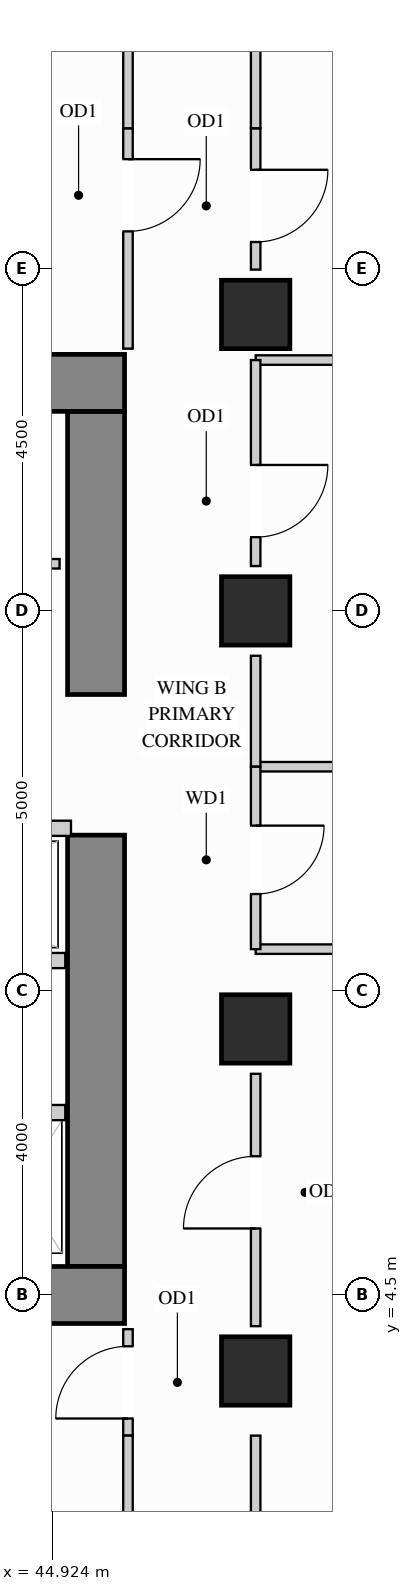
"""IFC4 building model, lengths in metres.
Left out: names, types, materials, properties, quantities, classifications, styles, units other than length and angle.
Written with IfcOpenShell. Run it as: python <this file> out.ifc"""

import sys

from ifc_helpers import new_model, si_unit, direction, frame, frame_2d, origin, origin_2d, place, context, subcontext, project, spatial, rectangle, extrude, source, transform, mapped, element, fill, save


model = new_model("IFC4")
c1 = context("Model", 3, precision=1e-05, world=origin(), true_north=direction((0.0, 1.0)))
c2 = subcontext(c1, "Body", "Model", "MODEL_VIEW")
j1 = project(units=[si_unit("LENGTHUNIT", "METRE"), si_unit("PLANEANGLEUNIT", "RADIAN")], contexts=[c1])
p1 = place(None, origin())
s1 = spatial("IfcSite", under=j1, at=p1, CompositionType="ELEMENT")
p2 = place(p1, origin())
s2 = spatial("IfcBuilding", under=s1, at=p2, CompositionType="ELEMENT")
p3 = place(p2, frame((0.0, 0.0, 131.4)))
s3 = spatial("IfcBuildingStorey", under=s2, at=p3, CompositionType="ELEMENT", Elevation=131.4)
m1 = source(origin(), c2, "Body", "SweptSolid", [
    extrude(rectangle(XDim=0.9, YDim=0.9, at=origin_2d()), origin(), (0.0, 0.0, 1.0), 3.38),
])
for number, where, z_axis, x_axis in (
    (1, (47.6, 13.5, 0.0), (0.0, 0.0, 1.0), (1.0, 0.0, 0.0)),
    (2, (47.6, 3.5, 0.0), (0.0, 0.0, 1.0), (1.0, 0.0, 0.0)),
    (3, (47.6, 8.0, 0.0), (0.0, 0.0, 1.0), (1.0, 0.0, 0.0)),
    (4, (47.6, 17.4, 0.0), (0.0, 0.0, 1.0), (1.0, 0.0, 0.0)),
):
    element("IfcColumn", number, at=place(p3, frame(where, z_axis=z_axis, x_axis=x_axis)), inside=s3, PredefinedType="COLUMN", context=c2, shape_type="MappedRepresentation", body=[
        mapped(m1, transform((0.0, 0.0, 0.0), x_axis=(1.0, 0.0, 0.0), y_axis=(0.0, 1.0, 0.0), z_axis=(0.0, 0.0, 1.0))),
    ])
m2 = source(origin(), c2, "Body", "SweptSolid", [
    extrude(rectangle(XDim=5.675, YDim=0.75, at=frame_2d((2.837, 0.0))), origin(), (0.0, 0.0, 1.0), 3.38),
])
p4 = place(p3, frame((45.5, 4.875, 0.0), z_axis=(0.0, 0.0, 1.0), x_axis=(0.0, 1.0, 0.0)))
e5 = element("IfcWall", 5, at=p4, inside=s3, PredefinedType="SHEAR", context=c2, shape_type="MappedRepresentation", body=[
    mapped(m2, transform((0.0, 0.0, 0.0), x_axis=(1.0, 0.0, 0.0), y_axis=(0.0, 1.0, 0.0), z_axis=(0.0, 0.0, 1.0))),
])
m3 = source(origin(), c2, "Body", "SweptSolid", [
    extrude(rectangle(XDim=3.725, YDim=0.75, at=frame_2d((1.863, 0.0))), origin(), (0.0, 0.0, 1.0), 3.38),
])
p5 = place(p3, frame((45.5, 12.4, 0.0), z_axis=(0.0, 0.0, 1.0), x_axis=(0.0, 1.0, 0.0)))
e6 = element("IfcWall", 6, at=p5, inside=s3, PredefinedType="SHEAR", context=c2, shape_type="MappedRepresentation", body=[
    mapped(m3, transform((0.0, 0.0, 0.0), x_axis=(1.0, 0.0, 0.0), y_axis=(0.0, 1.0, 0.0), z_axis=(0.0, 0.0, 1.0))),
])
m4 = source(origin(), c2, "Body", "SweptSolid", [
    extrude(rectangle(XDim=10.25, YDim=0.75, at=frame_2d((5.125, 0.0))), origin(), (0.0, 0.0, 1.0), 3.38),
])
for number, where, z_axis, x_axis in (
    (7, (35.625, 16.5, 0.0), (0.0, 0.0, 1.0), (1.0, 0.0, 0.0)),
    (8, (35.625, 4.5, 0.0), (0.0, 0.0, 1.0), (1.0, 0.0, 0.0)),
):
    element("IfcWall", number, at=place(p3, frame(where, z_axis=z_axis, x_axis=x_axis)), inside=s3, PredefinedType="SHEAR", context=c2, shape_type="MappedRepresentation", body=[
        mapped(m4, transform((0.0, 0.0, 0.0), x_axis=(1.0, 0.0, 0.0), y_axis=(0.0, 1.0, 0.0), z_axis=(0.0, 0.0, 1.0))),
    ])
p6 = place(p3, frame((41.8, 14.12, 0.0), z_axis=(0.0, 0.0, 1.0), x_axis=(1.0, 0.0, 0.0)))
e9 = element("IfcWall", 9, at=p6, inside=s3, PredefinedType="PARTITIONING", context=c2, shape_type="SweptSolid", body=[
    extrude(rectangle(XDim=3.22, YDim=0.125, at=frame_2d((1.61, 0.0))), origin(), (0.0, 0.0, 1.0), 3.365),
])
p7 = place(p6, frame((1.135, 0.0, 0.0)))
e10 = element("IfcOpeningElement", 10, at=p7, cuts=e9, PredefinedType="OPENING", context=c2, shape_type="SweptSolid", body=[
    extrude(rectangle(XDim=0.85, YDim=2.1, at=frame_2d((0.425, 1.05))), frame((0.0, 0.073, 0.0), z_axis=(0.0, -1.0, 0.0), x_axis=(1.0, 0.0, 0.0)), (0.0, 0.0, 1.0), 0.145),
])
m5 = source(origin(), c2, "Body", "SweptSolid", [
    extrude(rectangle(XDim=8.048, YDim=0.125, at=frame_2d((4.024, 0.0))), origin(), (0.0, 0.0, 1.0), 3.365),
])
for number, where, z_axis, x_axis in (
    (11, (47.6, 11.45, 0.0), (0.0, 0.0, 1.0), (1.0, 0.0, 0.0)),
    (12, (47.6, 16.8, 0.0), (0.0, 0.0, 1.0), (1.0, 0.0, 0.0)),
    (13, (47.6, 9.05, 0.0), (0.0, 0.0, 1.0), (1.0, 0.0, 0.0)),
):
    element("IfcWall", number, at=place(p3, frame(where, z_axis=z_axis, x_axis=x_axis)), inside=s3, PredefinedType="PARTITIONING", context=c2, shape_type="MappedRepresentation", body=[
        mapped(m5, transform((0.0, 0.0, 0.0), x_axis=(1.0, 0.0, 0.0), y_axis=(0.0, 1.0, 0.0), z_axis=(0.0, 0.0, 1.0))),
    ])
p8 = place(p3, frame((47.6, 4.09, 0.0), z_axis=(0.0, 0.0, 1.0), x_axis=(0.0, 1.0, 0.0)))
e14 = element("IfcWall", 14, at=p8, inside=s3, PredefinedType="PARTITIONING", context=c2, shape_type="SweptSolid", body=[
    extrude(rectangle(XDim=3.32, YDim=0.125, at=frame_2d((1.66, 0.0))), origin(), (0.0, 0.0, 1.0), 2.677),
])
p9 = place(p8, frame((1.285, 0.0, 0.0)))
e15 = element("IfcOpeningElement", 15, at=p9, cuts=e14, PredefinedType="OPENING", context=c2, shape_type="SweptSolid", body=[
    extrude(rectangle(XDim=0.95, YDim=2.15, at=frame_2d((0.475, 1.075))), frame((0.0, 0.073, 0.0), z_axis=(0.0, -1.0, 0.0), x_axis=(1.0, 0.0, 0.0)), (0.0, 0.0, 1.0), 0.145),
])
m6 = source(origin(), c2, "Body", "SweptSolid", [
    extrude(rectangle(XDim=1.46, YDim=0.125, at=frame_2d((0.73, 0.0))), origin(), (0.0, 0.0, 1.0), 2.677),
])
for number, where, z_axis, x_axis in (
    (16, (47.6, 1.19, 0.0), (0.0, 0.0, 1.0), (0.0, 1.0, 0.0)),
    (17, (47.6, 11.45, 0.0), (0.0, 0.0, 1.0), (0.0, 1.0, 0.0)),
):
    element("IfcWall", number, at=place(p3, frame(where, z_axis=z_axis, x_axis=x_axis)), inside=s3, PredefinedType="PARTITIONING", context=c2, shape_type="MappedRepresentation", body=[
        mapped(m6, transform((0.0, 0.0, 0.0), x_axis=(1.0, 0.0, 0.0), y_axis=(0.0, 1.0, 0.0), z_axis=(0.0, 0.0, 1.0))),
    ])
p10 = place(p3, frame((47.6, 14.09, 0.0), z_axis=(0.0, 0.0, 1.0), x_axis=(0.0, 1.0, 0.0)))
e18 = element("IfcWall", 18, at=p10, inside=s3, PredefinedType="PARTITIONING", context=c2, shape_type="SweptSolid", body=[
    extrude(rectangle(XDim=2.71, YDim=0.125, at=frame_2d((1.355, 0.0))), origin(), (0.0, 0.0, 1.0), 2.677),
])
p11 = place(p10, frame((0.38, 0.0, 0.0)))
e19 = element("IfcOpeningElement", 19, at=p11, cuts=e18, PredefinedType="OPENING", context=c2, shape_type="SweptSolid", body=[
    extrude(rectangle(XDim=0.95, YDim=2.15, at=frame_2d((0.475, 1.075))), frame((0.0, 0.073, 0.0), z_axis=(0.0, -1.0, 0.0), x_axis=(1.0, 0.0, 0.0)), (0.0, 0.0, 1.0), 0.145),
])
p12 = place(p3, frame((47.6, 17.99, 0.0), z_axis=(0.0, 0.0, 1.0), x_axis=(0.0, 1.0, 0.0)))
e20 = element("IfcWall", 20, at=p12, inside=s3, PredefinedType="PARTITIONING", context=c2, shape_type="SweptSolid", body=[
    extrude(rectangle(XDim=1.86, YDim=0.125, at=frame_2d((0.93, 0.0))), origin(), (0.0, 0.0, 1.0), 2.677),
])
p13 = place(p12, frame((0.363, 0.0, 0.0)))
e21 = element("IfcOpeningElement", 21, at=p13, cuts=e20, PredefinedType="OPENING", context=c2, shape_type="SweptSolid", body=[
    extrude(rectangle(XDim=0.95, YDim=2.15, at=frame_2d((0.475, 1.075))), frame((0.0, 0.073, 0.0), z_axis=(0.0, -1.0, 0.0), x_axis=(1.0, 0.0, 0.0)), (0.0, 0.0, 1.0), 0.145),
])
p14 = place(p3, frame((47.6, 19.85, 0.0), z_axis=(0.0, 0.0, 1.0), x_axis=(0.0, 1.0, 0.0)))
e22 = element("IfcWall", 22, at=p14, inside=s3, PredefinedType="PARTITIONING", context=c2, shape_type="MappedRepresentation", body=[
    mapped(m6, transform((0.0, 0.0, 0.0), x_axis=(1.0, 0.0, 0.0), y_axis=(0.0, 1.0, 0.0), z_axis=(0.0, 0.0, 1.0))),
])
p15 = place(p3, frame((47.6, 9.05, 0.0), z_axis=(0.0, 0.0, 1.0), x_axis=(0.0, 1.0, 0.0)))
e23 = element("IfcWall", 23, at=p15, inside=s3, PredefinedType="PARTITIONING", context=c2, shape_type="SweptSolid", body=[
    extrude(rectangle(XDim=2.4, YDim=0.125, at=frame_2d((1.2, 0.0))), origin(), (0.0, 0.0, 1.0), 2.677),
])
p16 = place(p15, frame((0.725, 0.0, 0.0)))
e24 = element("IfcOpeningElement", 24, at=p16, cuts=e23, PredefinedType="OPENING", context=c2, shape_type="SweptSolid", body=[
    extrude(rectangle(XDim=0.9, YDim=2.15, at=frame_2d((0.45, 1.075))), frame((0.0, 0.073, 0.0), z_axis=(0.0, -1.0, 0.0), x_axis=(1.0, 0.0, 0.0)), (0.0, 0.0, 1.0), 0.145),
])
p17 = place(p3, frame((45.92, 16.95, 0.0), z_axis=(0.0, 0.0, 1.0), x_axis=(0.0, 1.0, 0.0)))
e25 = element("IfcWall", 25, at=p17, inside=s3, PredefinedType="PARTITIONING", context=c2, shape_type="SweptSolid", body=[
    extrude(rectangle(XDim=2.9, YDim=0.125, at=frame_2d((1.45, 0.0))), origin(), (0.0, 0.0, 1.0), 3.365),
])
p18 = place(p17, frame((1.543, 0.0, 0.0)))
e26 = element("IfcOpeningElement", 26, at=p18, cuts=e25, PredefinedType="OPENING", context=c2, shape_type="SweptSolid", body=[
    extrude(rectangle(XDim=0.95, YDim=2.15, at=frame_2d((0.475, 1.075))), frame((0.0, 0.073, 0.0), z_axis=(0.0, -1.0, 0.0), x_axis=(1.0, 0.0, 0.0)), (0.0, 0.0, 1.0), 0.145),
])
m7 = source(origin(), c2, "Body", "SweptSolid", [
    extrude(rectangle(XDim=2.298, YDim=0.125, at=frame_2d((1.149, 0.0))), origin(), (0.0, 0.0, 1.0), 3.365),
])
p19 = place(p3, frame((45.92, 19.85, 0.0), z_axis=(0.0, 0.0, 1.0), x_axis=(0.0, 1.0, 0.0)))
e27 = element("IfcWall", 27, at=p19, inside=s3, PredefinedType="PARTITIONING", context=c2, shape_type="MappedRepresentation", body=[
    mapped(m7, transform((0.0, 0.0, 0.0), x_axis=(1.0, 0.0, 0.0), y_axis=(0.0, 1.0, 0.0), z_axis=(0.0, 0.0, 1.0))),
])
p20 = place(p3, frame((45.92, 2.65, 0.0), z_axis=(0.0, 0.0, 1.0), x_axis=(0.0, 1.0, 0.0)))
e28 = element("IfcWall", 28, at=p20, inside=s3, PredefinedType="PARTITIONING", context=c2, shape_type="SweptSolid", body=[
    extrude(rectangle(XDim=1.4, YDim=0.125, at=frame_2d((0.7, 0.0))), origin(), (0.0, 0.0, 1.0), 3.365),
])
p21 = place(p20, frame((0.225, 0.0, 0.0)))
e29 = element("IfcOpeningElement", 29, at=p21, cuts=e28, PredefinedType="OPENING", context=c2, shape_type="SweptSolid", body=[
    extrude(rectangle(XDim=0.95, YDim=2.15, at=frame_2d((0.475, 1.075))), frame((0.0, 0.073, 0.0), z_axis=(0.0, -1.0, 0.0), x_axis=(1.0, 0.0, 0.0)), (0.0, 0.0, 1.0), 0.145),
])
p22 = place(p3, frame((45.92, 0.352, 0.0), z_axis=(0.0, 0.0, 1.0), x_axis=(0.0, 1.0, 0.0)))
e30 = element("IfcWall", 30, at=p22, inside=s3, PredefinedType="PARTITIONING", context=c2, shape_type="MappedRepresentation", body=[
    mapped(m7, transform((0.0, 0.0, 0.0), x_axis=(1.0, 0.0, 0.0), y_axis=(0.0, 1.0, 0.0), z_axis=(0.0, 0.0, 1.0))),
])
m8 = source(origin(), c2, "Body", "SweptSolid", [
    extrude(rectangle(XDim=1.245, YDim=0.2, at=frame_2d((0.623, 0.0))), origin(), (0.0, 0.0, 1.0), 3.365),
])
p23 = place(p3, frame((43.85, 6.9, 0.0), z_axis=(0.0, 0.0, 1.0), x_axis=(1.0, 0.0, 0.0)))
e31 = element("IfcWall", 31, at=p23, inside=s3, PredefinedType="PARTITIONING", context=c2, shape_type="MappedRepresentation", body=[
    mapped(m8, transform((0.0, 0.0, 0.0), x_axis=(1.0, 0.0, 0.0), y_axis=(0.0, 1.0, 0.0), z_axis=(0.0, 0.0, 1.0))),
])
m9 = source(origin(), c2, "Body", "SweptSolid", [
    extrude(rectangle(XDim=3.49, YDim=0.2, at=frame_2d((1.745, 0.0))), origin(), (0.0, 0.0, 1.0), 3.365),
])
p24 = place(p3, frame((41.68, 10.64, 0.0), z_axis=(0.0, 0.0, 1.0), x_axis=(1.0, 0.0, 0.0)))
e32 = element("IfcWall", 32, at=p24, inside=s3, PredefinedType="PARTITIONING", context=c2, shape_type="MappedRepresentation", body=[
    mapped(m9, transform((0.0, 0.0, 0.0), x_axis=(1.0, 0.0, 0.0), y_axis=(0.0, 1.0, 0.0), z_axis=(0.0, 0.0, 1.0))),
])
m10 = source(origin(), c2, "Body", "SweptSolid", [
    extrude(rectangle(XDim=3.415, YDim=0.2, at=frame_2d((1.708, 0.0))), origin(), (0.0, 0.0, 1.0), 3.365),
])
p25 = place(p3, frame((41.68, 8.9, 0.0), z_axis=(0.0, 0.0, 1.0), x_axis=(1.0, 0.0, 0.0)))
e33 = element("IfcWall", 33, at=p25, inside=s3, PredefinedType="PARTITIONING", context=c2, shape_type="MappedRepresentation", body=[
    mapped(m10, transform((0.0, 0.0, 0.0), x_axis=(1.0, 0.0, 0.0), y_axis=(0.0, 1.0, 0.0), z_axis=(0.0, 0.0, 1.0))),
])
m11 = source(origin(), c2, "Body", "SweptSolid", [
    extrude(rectangle(XDim=0.95, YDim=2.15, at=frame_2d((0.475, 1.075))), frame((0.0, 0.025, 0.0), z_axis=(0.0, -1.0, 0.0), x_axis=(1.0, 0.0, 0.0)), (0.0, 0.0, 1.0), 0.05),
])
p26 = place(p18, origin())
e34 = element("IfcDoor", 34, at=p26, inside=s3, OperationType="SINGLE_SWING_RIGHT", PredefinedType="DOOR", context=c2, shape_type="MappedRepresentation", body=[
    mapped(m11, transform((0.0, 0.0, 0.0), x_axis=(1.0, 0.0, 0.0), y_axis=(0.0, 1.0, 0.0), z_axis=(0.0, 0.0, 1.0))),
])
fill(e26, e34)
p27 = place(p21, origin())
e35 = element("IfcDoor", 35, at=p27, inside=s3, OperationType="SINGLE_SWING_LEFT", PredefinedType="DOOR", context=c2, shape_type="MappedRepresentation", body=[
    mapped(m11, transform((0.0, 0.0, 0.0), x_axis=(1.0, 0.0, 0.0), y_axis=(0.0, 1.0, 0.0), z_axis=(0.0, 0.0, 1.0))),
])
fill(e29, e35)
p28 = place(p9, origin())
e36 = element("IfcDoor", 36, at=p28, inside=s3, OperationType="SINGLE_SWING_LEFT", PredefinedType="DOOR", context=c2, shape_type="MappedRepresentation", body=[
    mapped(m11, transform((0.0, 0.0, 0.0), x_axis=(1.0, 0.0, 0.0), y_axis=(0.0, 1.0, 0.0), z_axis=(0.0, 0.0, 1.0))),
])
fill(e15, e36)
p29 = place(p11, origin())
e37 = element("IfcDoor", 37, at=p29, inside=s3, OperationType="SINGLE_SWING_RIGHT", PredefinedType="DOOR", context=c2, shape_type="MappedRepresentation", body=[
    mapped(m11, transform((0.0, 0.0, 0.0), x_axis=(1.0, 0.0, 0.0), y_axis=(0.0, 1.0, 0.0), z_axis=(0.0, 0.0, 1.0))),
])
fill(e19, e37)
p30 = place(p13, origin())
e38 = element("IfcDoor", 38, at=p30, inside=s3, OperationType="SINGLE_SWING_RIGHT", PredefinedType="DOOR", context=c2, shape_type="MappedRepresentation", body=[
    mapped(m11, transform((0.0, 0.0, 0.0), x_axis=(1.0, 0.0, 0.0), y_axis=(0.0, 1.0, 0.0), z_axis=(0.0, 0.0, 1.0))),
])
fill(e21, e38)
m12 = source(origin(), c2, "Body", "SweptSolid", [
    extrude(rectangle(XDim=0.9, YDim=2.15, at=frame_2d((0.45, 1.075))), frame((0.0, 0.025, 0.0), z_axis=(0.0, -1.0, 0.0), x_axis=(1.0, 0.0, 0.0)), (0.0, 0.0, 1.0), 0.05),
])
p31 = place(p16, origin())
e39 = element("IfcDoor", 39, at=p31, inside=s3, OperationType="SINGLE_SWING_RIGHT", PredefinedType="DOOR", context=c2, shape_type="MappedRepresentation", body=[
    mapped(m12, transform((0.0, 0.0, 0.0), x_axis=(1.0, 0.0, 0.0), y_axis=(0.0, 1.0, 0.0), z_axis=(0.0, 0.0, 1.0))),
])
fill(e24, e39)
save(model, sys.argv[1])
